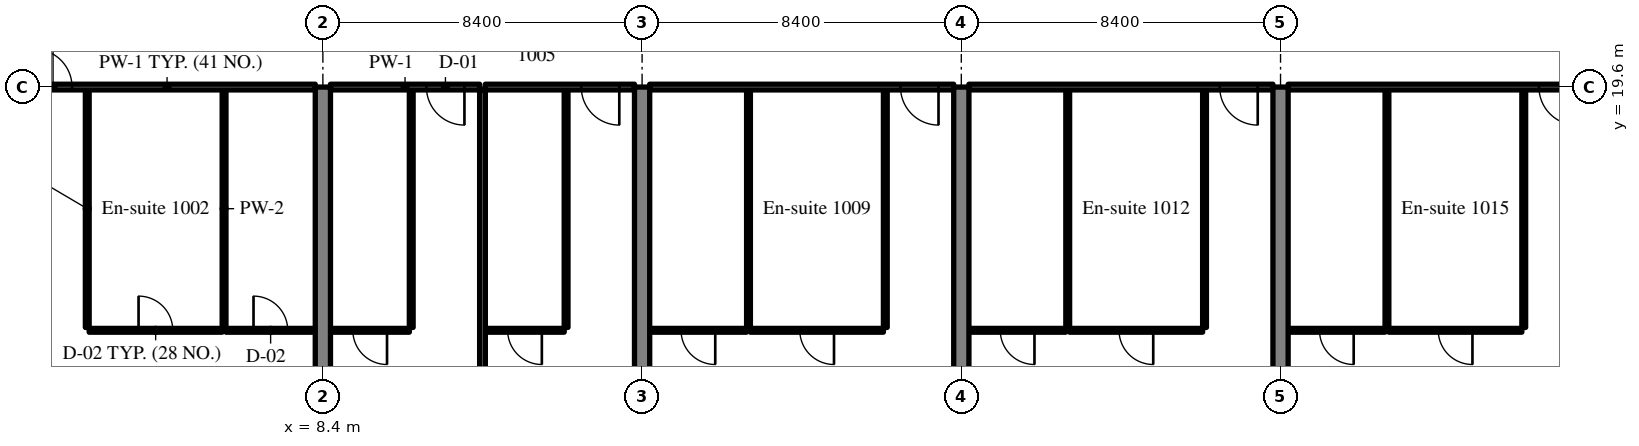
"""IFC4 building model, lengths in metres.
Left out: names, types, materials, properties, quantities, classifications, styles, units other than length and angle.
Written with IfcOpenShell. Run it as: python <this file> out.ifc"""

import sys

from ifc_helpers import new_model, si_unit, direction, frame, frame_2d, origin, place, context, subcontext, project, spatial, rectangle, extrude, source, transform, mapped, element, fill, save


model = new_model("IFC4")
c1 = context("Model", 3, precision=1e-05, world=origin(), true_north=direction((0.0, 1.0)))
c2 = subcontext(c1, "Body", "Model", "MODEL_VIEW")
j1 = project(units=[si_unit("LENGTHUNIT", "METRE"), si_unit("PLANEANGLEUNIT", "RADIAN")], contexts=[c1])
p1 = place(None, origin())
s1 = spatial("IfcSite", under=j1, at=p1, CompositionType="ELEMENT")
p2 = place(p1, origin())
s2 = spatial("IfcBuilding", under=s1, at=p2, CompositionType="ELEMENT")
p3 = place(p2, frame((0.0, 0.0, 46.8)))
s3 = spatial("IfcBuildingStorey", under=s2, at=p3, CompositionType="ELEMENT", Elevation=46.8)
m1 = source(origin(), c2, "Body", "SweptSolid", [
    extrude(rectangle(XDim=19.6, YDim=0.4, at=frame_2d((9.8, 0.0))), origin(), (0.0, 0.0, 1.0), 3.52),
])
for number, where, z_axis, x_axis in (
    (1, (8.4, 0.0, 0.0), (0.0, 0.0, 1.0), (0.0, 1.0, 0.0)),
    (2, (16.8, 0.0, 0.0), (0.0, 0.0, 1.0), (0.0, 1.0, 0.0)),
    (3, (25.2, 0.0, 0.0), (0.0, 0.0, 1.0), (0.0, 1.0, 0.0)),
    (4, (33.6, 0.0, 0.0), (0.0, 0.0, 1.0), (0.0, 1.0, 0.0)),
):
    element("IfcWall", number, at=place(p3, frame(where, z_axis=z_axis, x_axis=x_axis)), inside=s3, PredefinedType="SHEAR", context=c2, shape_type="MappedRepresentation", body=[
        mapped(m1, transform((0.0, 0.0, 0.0), scale=1.0)),
    ])
m2 = source(origin(), c2, "Body", "SweptSolid", [
    extrude(rectangle(XDim=6.25, YDim=0.1, at=frame_2d((3.125, 0.0))), origin(), (0.0, 0.0, 1.0), 3.52),
])
for number, where, z_axis, x_axis in (
    (5, (2.2, 13.275, 0.0), (0.0, 0.0, 1.0), (0.0, 1.0, 0.0)),
    (6, (5.8, 13.275, 0.0), (0.0, 0.0, 1.0), (0.0, 1.0, 0.0)),
):
    element("IfcWall", number, at=place(p3, frame(where, z_axis=z_axis, x_axis=x_axis)), inside=s3, PredefinedType="PARTITIONING", context=c2, shape_type="MappedRepresentation", body=[
        mapped(m2, transform((0.0, 0.0, 0.0), scale=1.0)),
    ])
m3 = source(origin(), c2, "Body", "SweptSolid", [
    extrude(rectangle(XDim=3.5, YDim=0.1, at=frame_2d((1.75, 0.0))), origin(), (0.0, 0.0, 1.0), 3.52),
])
p4 = place(p3, frame((2.25, 13.2, 0.0), z_axis=(0.0, 0.0, 1.0), x_axis=(1.0, 0.0, 0.0)))
e7 = element("IfcWall", 7, at=p4, inside=s3, PredefinedType="PARTITIONING", context=c2, shape_type="MappedRepresentation", body=[
    mapped(m3, transform((0.0, 0.0, 0.0), scale=1.0)),
])
m4 = source(origin(), c2, "Body", "SweptSolid", [
    extrude(rectangle(XDim=0.9, YDim=2.1, at=frame_2d((0.45, 1.05))), frame((0.0, 0.06, 0.0), z_axis=(0.0, -1.0, 0.0), x_axis=(1.0, 0.0, 0.0)), (0.0, 0.0, 1.0), 0.12),
])
p5 = place(p4, frame((1.3, 0.0, 0.0)))
e8 = element("IfcOpeningElement", 8, at=p5, cuts=e7, PredefinedType="OPENING", context=c2, shape_type="MappedRepresentation", body=[
    mapped(m4, transform((0.0, 0.0, 0.0), scale=1.0)),
])
m5 = source(origin(), c2, "Body", "SweptSolid", [
    extrude(rectangle(XDim=2.35, YDim=0.1, at=frame_2d((1.175, 0.0))), origin(), (0.0, 0.0, 1.0), 3.52),
])
p6 = place(p3, frame((5.85, 13.2, 0.0), z_axis=(0.0, 0.0, 1.0), x_axis=(1.0, 0.0, 0.0)))
e9 = element("IfcWall", 9, at=p6, inside=s3, PredefinedType="PARTITIONING", context=c2, shape_type="MappedRepresentation", body=[
    mapped(m5, transform((0.0, 0.0, 0.0), scale=1.0)),
])
p7 = place(p6, frame((0.725, 0.0, 0.0)))
e10 = element("IfcOpeningElement", 10, at=p7, cuts=e9, PredefinedType="OPENING", context=c2, shape_type="MappedRepresentation", body=[
    mapped(m4, transform((0.0, 0.0, 0.0), scale=1.0)),
])
m6 = source(origin(), c2, "Body", "SweptSolid", [
    extrude(rectangle(XDim=7.8, YDim=0.15, at=frame_2d((3.9, 0.0))), origin(), (0.0, 0.0, 1.0), 2.82),
])
p8 = place(p3, frame((0.4, 19.6, 0.0), z_axis=(0.0, 0.0, 1.0), x_axis=(1.0, 0.0, 0.0)))
e11 = element("IfcWall", 11, at=p8, inside=s3, PredefinedType="PARTITIONING", context=c2, shape_type="MappedRepresentation", body=[
    mapped(m6, transform((0.0, 0.0, 0.0), scale=1.0)),
])
m7 = source(origin(), c2, "Body", "SweptSolid", [
    extrude(rectangle(XDim=1.0, YDim=2.1, at=frame_2d((0.5, 1.05))), frame((0.0, 0.085, 0.0), z_axis=(0.0, -1.0, 0.0), x_axis=(1.0, 0.0, 0.0)), (0.0, 0.0, 1.0), 0.17),
])
p9 = place(p8, frame((0.4, 0.0, 0.0)))
e12 = element("IfcOpeningElement", 12, at=p9, cuts=e11, PredefinedType="OPENING", context=c2, shape_type="MappedRepresentation", body=[
    mapped(m7, transform((0.0, 0.0, 0.0), scale=1.0)),
])
p10 = place(p3, frame((10.725, 13.275, 0.0), z_axis=(0.0, 0.0, 1.0), x_axis=(0.0, 1.0, 0.0)))
e13 = element("IfcWall", 13, at=p10, inside=s3, PredefinedType="PARTITIONING", context=c2, shape_type="MappedRepresentation", body=[
    mapped(m2, transform((0.0, 0.0, 0.0), scale=1.0)),
])
m8 = source(origin(), c2, "Body", "SweptSolid", [
    extrude(rectangle(XDim=2.075, YDim=0.1, at=frame_2d((1.038, 0.0))), origin(), (0.0, 0.0, 1.0), 3.52),
])
p11 = place(p3, frame((8.6, 13.2, 0.0), z_axis=(0.0, 0.0, 1.0), x_axis=(1.0, 0.0, 0.0)))
e14 = element("IfcWall", 14, at=p11, inside=s3, PredefinedType="PARTITIONING", context=c2, shape_type="MappedRepresentation", body=[
    mapped(m8, transform((0.0, 0.0, 0.0), scale=1.0)),
])
p12 = place(p11, frame((0.588, 0.0, 0.0)))
e15 = element("IfcOpeningElement", 15, at=p12, cuts=e14, PredefinedType="OPENING", context=c2, shape_type="MappedRepresentation", body=[
    mapped(m4, transform((0.0, 0.0, 0.0), scale=1.0)),
])
m9 = source(origin(), c2, "Body", "SweptSolid", [
    extrude(rectangle(XDim=3.925, YDim=0.15, at=frame_2d((1.962, 0.0))), origin(), (0.0, 0.0, 1.0), 2.82),
])
p13 = place(p3, frame((8.6, 19.6, 0.0), z_axis=(0.0, 0.0, 1.0), x_axis=(1.0, 0.0, 0.0)))
e16 = element("IfcWall", 16, at=p13, inside=s3, PredefinedType="PARTITIONING", context=c2, shape_type="MappedRepresentation", body=[
    mapped(m9, transform((0.0, 0.0, 0.0), scale=1.0)),
])
p14 = place(p13, frame((2.525, 0.0, 0.0)))
e17 = element("IfcOpeningElement", 17, at=p14, cuts=e16, PredefinedType="OPENING", context=c2, shape_type="MappedRepresentation", body=[
    mapped(m7, transform((0.0, 0.0, 0.0), scale=1.0)),
])
p15 = place(p3, frame((14.8, 13.275, 0.0), z_axis=(0.0, 0.0, 1.0), x_axis=(0.0, 1.0, 0.0)))
e18 = element("IfcWall", 18, at=p15, inside=s3, PredefinedType="PARTITIONING", context=c2, shape_type="MappedRepresentation", body=[
    mapped(m2, transform((0.0, 0.0, 0.0), scale=1.0)),
])
p16 = place(p3, frame((12.675, 13.2, 0.0), z_axis=(0.0, 0.0, 1.0), x_axis=(1.0, 0.0, 0.0)))
e19 = element("IfcWall", 19, at=p16, inside=s3, PredefinedType="PARTITIONING", context=c2, shape_type="MappedRepresentation", body=[
    mapped(m8, transform((0.0, 0.0, 0.0), scale=1.0)),
])
p17 = place(p16, frame((0.587, 0.0, 0.0)))
e20 = element("IfcOpeningElement", 20, at=p17, cuts=e19, PredefinedType="OPENING", context=c2, shape_type="MappedRepresentation", body=[
    mapped(m4, transform((0.0, 0.0, 0.0), scale=1.0)),
])
m10 = source(origin(), c2, "Body", "SweptSolid", [
    extrude(rectangle(XDim=3.925, YDim=0.15, at=frame_2d((1.962, 0.0))), origin(), (0.0, 0.0, 1.0), 2.82),
])
p18 = place(p3, frame((12.675, 19.6, 0.0), z_axis=(0.0, 0.0, 1.0), x_axis=(1.0, 0.0, 0.0)))
e21 = element("IfcWall", 21, at=p18, inside=s3, PredefinedType="PARTITIONING", context=c2, shape_type="MappedRepresentation", body=[
    mapped(m10, transform((0.0, 0.0, 0.0), scale=1.0)),
])
p19 = place(p18, frame((2.525, 0.0, 0.0)))
e22 = element("IfcOpeningElement", 22, at=p19, cuts=e21, PredefinedType="OPENING", context=c2, shape_type="MappedRepresentation", body=[
    mapped(m7, transform((0.0, 0.0, 0.0), scale=1.0)),
])
m11 = source(origin(), c2, "Body", "SweptSolid", [
    extrude(rectangle(XDim=18.725, YDim=0.15, at=frame_2d((9.362, 0.0))), origin(), (0.0, 0.0, 1.0), 3.52),
])
p20 = place(p3, frame((12.6, 0.8, 0.0), z_axis=(0.0, 0.0, 1.0), x_axis=(0.0, 1.0, 0.0)))
e23 = element("IfcWall", 23, at=p20, inside=s3, PredefinedType="PARTITIONING", context=c2, shape_type="MappedRepresentation", body=[
    mapped(m11, transform((0.0, 0.0, 0.0), scale=1.0)),
])
for number, where, z_axis, x_axis in (
    (24, (23.2, 13.275, 0.0), (0.0, 0.0, 1.0), (0.0, 1.0, 0.0)),
    (25, (19.6, 13.275, 0.0), (0.0, 0.0, 1.0), (0.0, 1.0, 0.0)),
):
    element("IfcWall", number, at=place(p3, frame(where, z_axis=z_axis, x_axis=x_axis)), inside=s3, PredefinedType="PARTITIONING", context=c2, shape_type="MappedRepresentation", body=[
        mapped(m2, transform((0.0, 0.0, 0.0), scale=1.0)),
    ])
p21 = place(p3, frame((19.65, 13.2, 0.0), z_axis=(0.0, 0.0, 1.0), x_axis=(1.0, 0.0, 0.0)))
e26 = element("IfcWall", 26, at=p21, inside=s3, PredefinedType="PARTITIONING", context=c2, shape_type="MappedRepresentation", body=[
    mapped(m3, transform((0.0, 0.0, 0.0), scale=1.0)),
])
p22 = place(p21, frame((1.3, 0.0, 0.0)))
e27 = element("IfcOpeningElement", 27, at=p22, cuts=e26, PredefinedType="OPENING", context=c2, shape_type="MappedRepresentation", body=[
    mapped(m4, transform((0.0, 0.0, 0.0), scale=1.0)),
])
m12 = source(origin(), c2, "Body", "SweptSolid", [
    extrude(rectangle(XDim=2.55, YDim=0.1, at=frame_2d((1.275, 0.0))), origin(), (0.0, 0.0, 1.0), 3.52),
])
p23 = place(p3, frame((17.0, 13.2, 0.0), z_axis=(0.0, 0.0, 1.0), x_axis=(1.0, 0.0, 0.0)))
e28 = element("IfcWall", 28, at=p23, inside=s3, PredefinedType="PARTITIONING", context=c2, shape_type="MappedRepresentation", body=[
    mapped(m12, transform((0.0, 0.0, 0.0), scale=1.0)),
])
p24 = place(p23, frame((0.825, 0.0, 0.0)))
e29 = element("IfcOpeningElement", 29, at=p24, cuts=e28, PredefinedType="OPENING", context=c2, shape_type="MappedRepresentation", body=[
    mapped(m4, transform((0.0, 0.0, 0.0), scale=1.0)),
])
m13 = source(origin(), c2, "Body", "SweptSolid", [
    extrude(rectangle(XDim=8.0, YDim=0.15, at=frame_2d((4.0, 0.0))), origin(), (0.0, 0.0, 1.0), 2.82),
])
p25 = place(p3, frame((17.0, 19.6, 0.0), z_axis=(0.0, 0.0, 1.0), x_axis=(1.0, 0.0, 0.0)))
e30 = element("IfcWall", 30, at=p25, inside=s3, PredefinedType="PARTITIONING", context=c2, shape_type="MappedRepresentation", body=[
    mapped(m13, transform((0.0, 0.0, 0.0), scale=1.0)),
])
p26 = place(p25, frame((6.6, 0.0, 0.0)))
e31 = element("IfcOpeningElement", 31, at=p26, cuts=e30, PredefinedType="OPENING", context=c2, shape_type="MappedRepresentation", body=[
    mapped(m7, transform((0.0, 0.0, 0.0), scale=1.0)),
])
for number, where, z_axis, x_axis in (
    (32, (31.6, 13.275, 0.0), (0.0, 0.0, 1.0), (0.0, 1.0, 0.0)),
    (33, (28.0, 13.275, 0.0), (0.0, 0.0, 1.0), (0.0, 1.0, 0.0)),
):
    element("IfcWall", number, at=place(p3, frame(where, z_axis=z_axis, x_axis=x_axis)), inside=s3, PredefinedType="PARTITIONING", context=c2, shape_type="MappedRepresentation", body=[
        mapped(m2, transform((0.0, 0.0, 0.0), scale=1.0)),
    ])
p27 = place(p3, frame((28.05, 13.2, 0.0), z_axis=(0.0, 0.0, 1.0), x_axis=(1.0, 0.0, 0.0)))
e34 = element("IfcWall", 34, at=p27, inside=s3, PredefinedType="PARTITIONING", context=c2, shape_type="MappedRepresentation", body=[
    mapped(m3, transform((0.0, 0.0, 0.0), scale=1.0)),
])
p28 = place(p27, frame((1.3, 0.0, 0.0)))
e35 = element("IfcOpeningElement", 35, at=p28, cuts=e34, PredefinedType="OPENING", context=c2, shape_type="MappedRepresentation", body=[
    mapped(m4, transform((0.0, 0.0, 0.0), scale=1.0)),
])
p29 = place(p3, frame((25.4, 13.2, 0.0), z_axis=(0.0, 0.0, 1.0), x_axis=(1.0, 0.0, 0.0)))
e36 = element("IfcWall", 36, at=p29, inside=s3, PredefinedType="PARTITIONING", context=c2, shape_type="MappedRepresentation", body=[
    mapped(m12, transform((0.0, 0.0, 0.0), scale=1.0)),
])
p30 = place(p29, frame((0.825, 0.0, 0.0)))
e37 = element("IfcOpeningElement", 37, at=p30, cuts=e36, PredefinedType="OPENING", context=c2, shape_type="MappedRepresentation", body=[
    mapped(m4, transform((0.0, 0.0, 0.0), scale=1.0)),
])
p31 = place(p3, frame((25.4, 19.6, 0.0), z_axis=(0.0, 0.0, 1.0), x_axis=(1.0, 0.0, 0.0)))
e38 = element("IfcWall", 38, at=p31, inside=s3, PredefinedType="PARTITIONING", context=c2, shape_type="MappedRepresentation", body=[
    mapped(m13, transform((0.0, 0.0, 0.0), scale=1.0)),
])
p32 = place(p31, frame((6.6, 0.0, 0.0)))
e39 = element("IfcOpeningElement", 39, at=p32, cuts=e38, PredefinedType="OPENING", context=c2, shape_type="MappedRepresentation", body=[
    mapped(m7, transform((0.0, 0.0, 0.0), scale=1.0)),
])
for number, where, z_axis, x_axis in (
    (40, (40.0, 13.275, 0.0), (0.0, 0.0, 1.0), (0.0, 1.0, 0.0)),
    (41, (36.4, 13.275, 0.0), (0.0, 0.0, 1.0), (0.0, 1.0, 0.0)),
):
    element("IfcWall", number, at=place(p3, frame(where, z_axis=z_axis, x_axis=x_axis)), inside=s3, PredefinedType="PARTITIONING", context=c2, shape_type="MappedRepresentation", body=[
        mapped(m2, transform((0.0, 0.0, 0.0), scale=1.0)),
    ])
p33 = place(p3, frame((36.45, 13.2, 0.0), z_axis=(0.0, 0.0, 1.0), x_axis=(1.0, 0.0, 0.0)))
e42 = element("IfcWall", 42, at=p33, inside=s3, PredefinedType="PARTITIONING", context=c2, shape_type="MappedRepresentation", body=[
    mapped(m3, transform((0.0, 0.0, 0.0), scale=1.0)),
])
p34 = place(p33, frame((1.3, 0.0, 0.0)))
e43 = element("IfcOpeningElement", 43, at=p34, cuts=e42, PredefinedType="OPENING", context=c2, shape_type="MappedRepresentation", body=[
    mapped(m4, transform((0.0, 0.0, 0.0), scale=1.0)),
])
p35 = place(p3, frame((33.8, 13.2, 0.0), z_axis=(0.0, 0.0, 1.0), x_axis=(1.0, 0.0, 0.0)))
e44 = element("IfcWall", 44, at=p35, inside=s3, PredefinedType="PARTITIONING", context=c2, shape_type="MappedRepresentation", body=[
    mapped(m12, transform((0.0, 0.0, 0.0), scale=1.0)),
])
p36 = place(p35, frame((0.825, 0.0, 0.0)))
e45 = element("IfcOpeningElement", 45, at=p36, cuts=e44, PredefinedType="OPENING", context=c2, shape_type="MappedRepresentation", body=[
    mapped(m4, transform((0.0, 0.0, 0.0), scale=1.0)),
])
p37 = place(p3, frame((33.8, 19.6, 0.0), z_axis=(0.0, 0.0, 1.0), x_axis=(1.0, 0.0, 0.0)))
e46 = element("IfcWall", 46, at=p37, inside=s3, PredefinedType="PARTITIONING", context=c2, shape_type="MappedRepresentation", body=[
    mapped(m13, transform((0.0, 0.0, 0.0), scale=1.0)),
])
p38 = place(p37, frame((6.6, 0.0, 0.0)))
e47 = element("IfcOpeningElement", 47, at=p38, cuts=e46, PredefinedType="OPENING", context=c2, shape_type="MappedRepresentation", body=[
    mapped(m7, transform((0.0, 0.0, 0.0), scale=1.0)),
])
m14 = source(origin(), c2, "Body", "SweptSolid", [
    extrude(rectangle(XDim=0.9, YDim=2.1, at=frame_2d((0.45, 1.05))), frame((0.0, 0.025, 0.0), z_axis=(0.0, -1.0, 0.0), x_axis=(1.0, 0.0, 0.0)), (0.0, 0.0, 1.0), 0.05),
])
p39 = place(p5, origin())
e48 = element("IfcDoor", 48, at=p39, inside=s3, OperationType="SINGLE_SWING_LEFT", PredefinedType="DOOR", context=c2, shape_type="MappedRepresentation", body=[
    mapped(m14, transform((0.0, 0.0, 0.0), scale=1.0)),
])
fill(e8, e48)
p40 = place(p7, origin())
e49 = element("IfcDoor", 49, at=p40, inside=s3, OperationType="SINGLE_SWING_LEFT", PredefinedType="DOOR", context=c2, shape_type="MappedRepresentation", body=[
    mapped(m14, transform((0.0, 0.0, 0.0), scale=1.0)),
])
fill(e10, e49)
m15 = source(origin(), c2, "Body", "SweptSolid", [
    extrude(rectangle(XDim=1.0, YDim=2.1, at=frame_2d((0.5, 1.05))), frame((0.0, 0.025, 0.0), z_axis=(0.0, -1.0, 0.0), x_axis=(1.0, 0.0, 0.0)), (0.0, 0.0, 1.0), 0.05),
])
p41 = place(p9, origin())
e50 = element("IfcDoor", 50, at=p41, inside=s3, OperationType="SINGLE_SWING_LEFT", PredefinedType="DOOR", context=c2, shape_type="MappedRepresentation", body=[
    mapped(m15, transform((0.0, 0.0, 0.0), scale=1.0)),
])
fill(e12, e50)
p42 = place(p12, origin())
e51 = element("IfcDoor", 51, at=p42, inside=s3, OperationType="SINGLE_SWING_RIGHT", PredefinedType="DOOR", context=c2, shape_type="MappedRepresentation", body=[
    mapped(m14, transform((0.0, 0.0, 0.0), scale=1.0)),
])
fill(e15, e51)
p43 = place(p14, origin())
e52 = element("IfcDoor", 52, at=p43, inside=s3, OperationType="SINGLE_SWING_RIGHT", PredefinedType="DOOR", context=c2, shape_type="MappedRepresentation", body=[
    mapped(m15, transform((0.0, 0.0, 0.0), scale=1.0)),
])
fill(e17, e52)
p44 = place(p17, origin())
e53 = element("IfcDoor", 53, at=p44, inside=s3, OperationType="SINGLE_SWING_RIGHT", PredefinedType="DOOR", context=c2, shape_type="MappedRepresentation", body=[
    mapped(m14, transform((0.0, 0.0, 0.0), scale=1.0)),
])
fill(e20, e53)
p45 = place(p19, origin())
e54 = element("IfcDoor", 54, at=p45, inside=s3, OperationType="SINGLE_SWING_RIGHT", PredefinedType="DOOR", context=c2, shape_type="MappedRepresentation", body=[
    mapped(m15, transform((0.0, 0.0, 0.0), scale=1.0)),
])
fill(e22, e54)
p46 = place(p22, origin())
e55 = element("IfcDoor", 55, at=p46, inside=s3, OperationType="SINGLE_SWING_RIGHT", PredefinedType="DOOR", context=c2, shape_type="MappedRepresentation", body=[
    mapped(m14, transform((0.0, 0.0, 0.0), scale=1.0)),
])
fill(e27, e55)
p47 = place(p24, origin())
e56 = element("IfcDoor", 56, at=p47, inside=s3, OperationType="SINGLE_SWING_RIGHT", PredefinedType="DOOR", context=c2, shape_type="MappedRepresentation", body=[
    mapped(m14, transform((0.0, 0.0, 0.0), scale=1.0)),
])
fill(e29, e56)
p48 = place(p26, origin())
e57 = element("IfcDoor", 57, at=p48, inside=s3, OperationType="SINGLE_SWING_RIGHT", PredefinedType="DOOR", context=c2, shape_type="MappedRepresentation", body=[
    mapped(m15, transform((0.0, 0.0, 0.0), scale=1.0)),
])
fill(e31, e57)
p49 = place(p28, origin())
e58 = element("IfcDoor", 58, at=p49, inside=s3, OperationType="SINGLE_SWING_RIGHT", PredefinedType="DOOR", context=c2, shape_type="MappedRepresentation", body=[
    mapped(m14, transform((0.0, 0.0, 0.0), scale=1.0)),
])
fill(e35, e58)
p50 = place(p30, origin())
e59 = element("IfcDoor", 59, at=p50, inside=s3, OperationType="SINGLE_SWING_RIGHT", PredefinedType="DOOR", context=c2, shape_type="MappedRepresentation", body=[
    mapped(m14, transform((0.0, 0.0, 0.0), scale=1.0)),
])
fill(e37, e59)
p51 = place(p32, origin())
e60 = element("IfcDoor", 60, at=p51, inside=s3, OperationType="SINGLE_SWING_RIGHT", PredefinedType="DOOR", context=c2, shape_type="MappedRepresentation", body=[
    mapped(m15, transform((0.0, 0.0, 0.0), scale=1.0)),
])
fill(e39, e60)
p52 = place(p34, origin())
e61 = element("IfcDoor", 61, at=p52, inside=s3, OperationType="SINGLE_SWING_RIGHT", PredefinedType="DOOR", context=c2, shape_type="MappedRepresentation", body=[
    mapped(m14, transform((0.0, 0.0, 0.0), scale=1.0)),
])
fill(e43, e61)
p53 = place(p36, origin())
e62 = element("IfcDoor", 62, at=p53, inside=s3, OperationType="SINGLE_SWING_RIGHT", PredefinedType="DOOR", context=c2, shape_type="MappedRepresentation", body=[
    mapped(m14, transform((0.0, 0.0, 0.0), scale=1.0)),
])
fill(e45, e62)
p54 = place(p38, origin())
e63 = element("IfcDoor", 63, at=p54, inside=s3, OperationType="SINGLE_SWING_RIGHT", PredefinedType="DOOR", context=c2, shape_type="MappedRepresentation", body=[
    mapped(m15, transform((0.0, 0.0, 0.0), scale=1.0)),
])
fill(e47, e63)
save(model, sys.argv[1])
